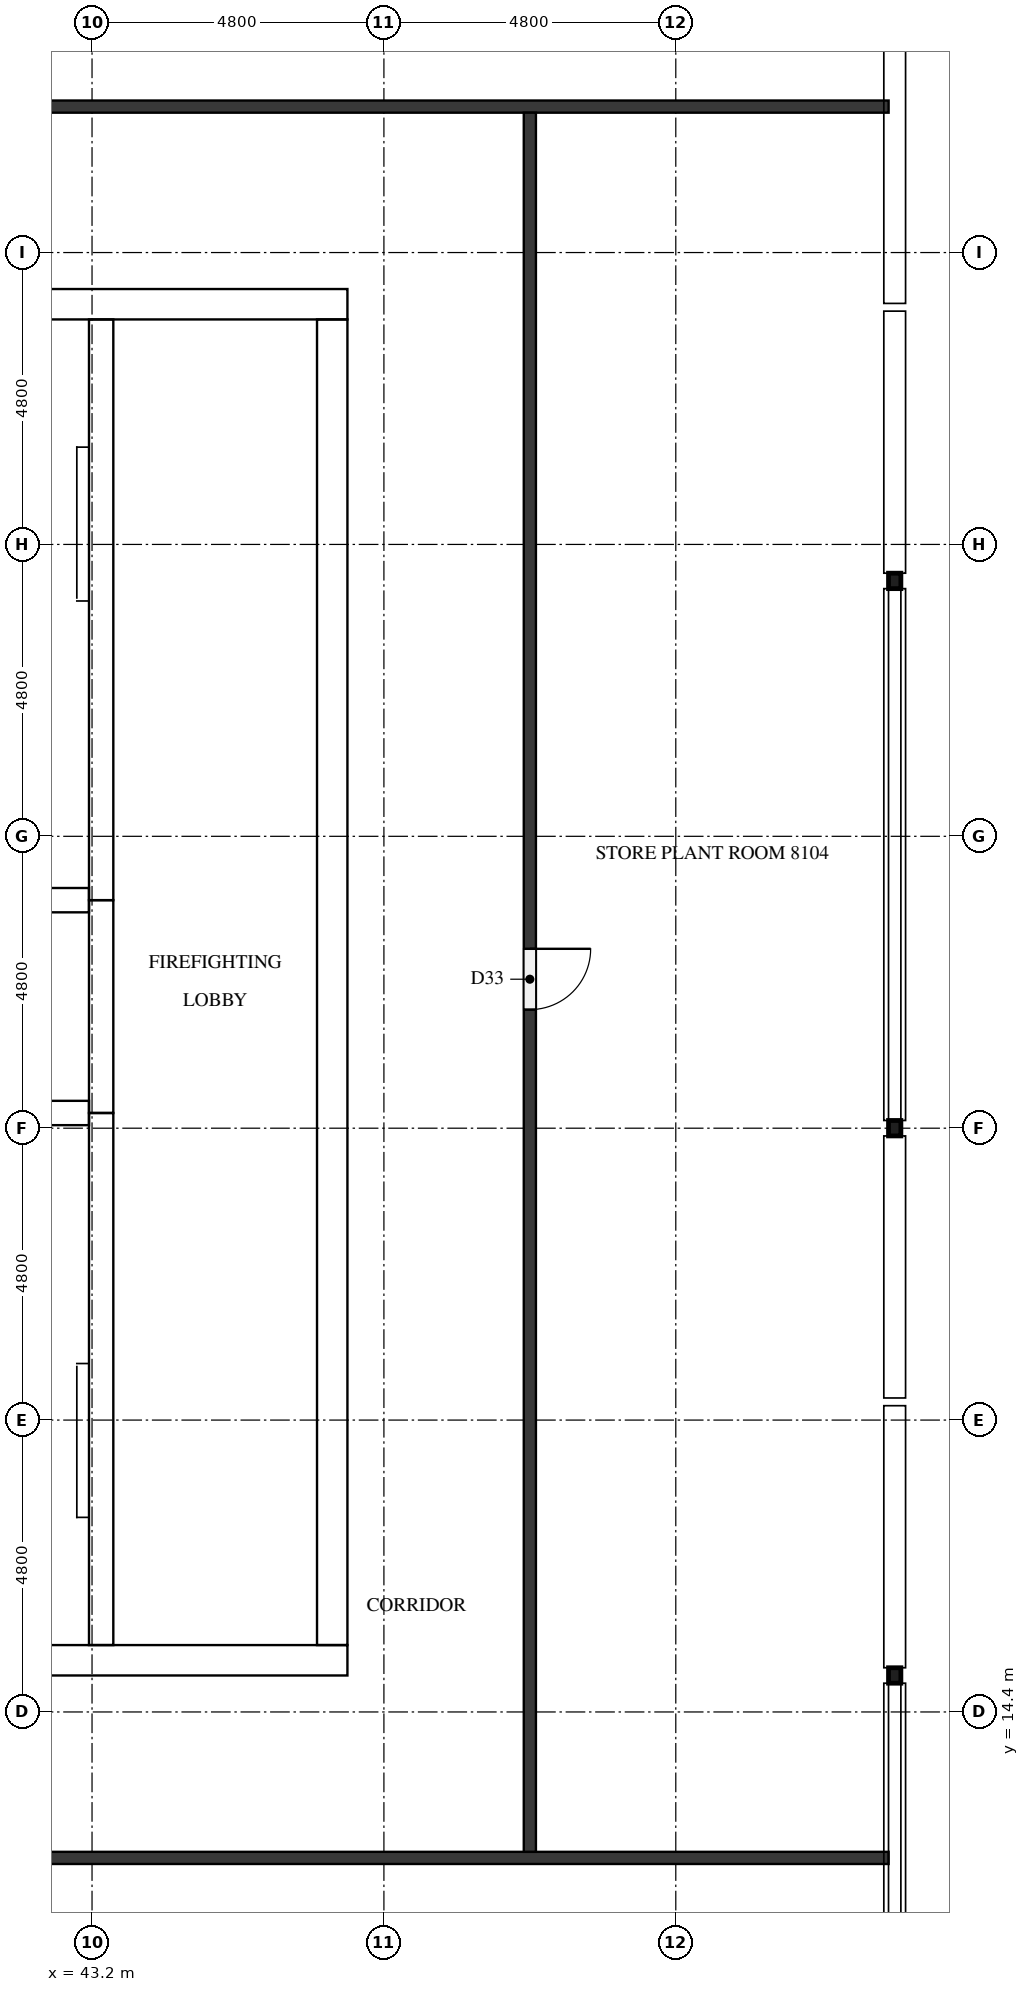
"""IFC4 building model, lengths in metres.
Left out: names, types, materials, properties, quantities, classifications, styles, units other than length and angle.
Written with IfcOpenShell. Run it as: python <this file> out.ifc"""

import sys

from ifc_helpers import new_model, si_unit, direction, frame, frame_2d, origin, origin_2d, place, context, subcontext, project, spatial, rectangle, hollow_rectangle, extrude, element, fill, save


model = new_model("IFC4")
c1 = context("Model", 3, precision=1e-05, world=origin(), true_north=direction((0.0, 1.0)))
c2 = subcontext(c1, "Body", "Model", "MODEL_VIEW")
j1 = project(units=[si_unit("LENGTHUNIT", "METRE"), si_unit("PLANEANGLEUNIT", "RADIAN")], contexts=[c1])
p1 = place(None, origin())
s1 = spatial("IfcSite", under=j1, at=p1, CompositionType="ELEMENT")
p2 = place(p1, origin())
s2 = spatial("IfcBuilding", under=s1, at=p2, CompositionType="ELEMENT")
p3 = place(p2, frame((0.0, 0.0, 314.3)))
s3 = spatial("IfcBuildingStorey", under=s2, at=p3, CompositionType="ELEMENT", Elevation=314.3)
p4 = place(p3, frame((15.0, 15.25, 0.0), z_axis=(0.0, 0.0, 1.0), x_axis=(1.0, 0.0, 0.0)))
e1 = element("IfcWall", 1, at=p4, inside=s3, PredefinedType="SHEAR", context=c2, shape_type="SweptSolid", body=[
    extrude(rectangle(XDim=32.4, YDim=0.5, at=frame_2d((16.2, 0.0))), origin(), (0.0, 0.0, 1.0), 2.6),
])
p5 = place(p4, frame((15.3, 0.0, 0.0)))
e2 = element("IfcOpeningElement", 2, at=p5, cuts=e1, PredefinedType="OPENING", context=c2, shape_type="SweptSolid", body=[
    extrude(rectangle(XDim=1.8, YDim=2.1, at=frame_2d((0.9, 1.05))), frame((0.0, 0.26, 0.0), z_axis=(0.0, -1.0, 0.0), x_axis=(1.0, 0.0, 0.0)), (0.0, 0.0, 1.0), 0.52),
])
p6 = place(p3, frame((15.0, 37.55, 0.0), z_axis=(0.0, 0.0, 1.0), x_axis=(1.0, 0.0, 0.0)))
e3 = element("IfcWall", 3, at=p6, inside=s3, PredefinedType="SHEAR", context=c2, shape_type="SweptSolid", body=[
    extrude(rectangle(XDim=32.4, YDim=0.5, at=frame_2d((16.2, 0.0))), origin(), (0.0, 0.0, 1.0), 2.6),
])
p7 = place(p6, frame((15.3, 0.0, 0.0)))
e4 = element("IfcOpeningElement", 4, at=p7, cuts=e3, PredefinedType="OPENING", context=c2, shape_type="SweptSolid", body=[
    extrude(rectangle(XDim=1.8, YDim=2.1, at=frame_2d((0.9, 1.05))), frame((0.0, 0.26, 0.0), z_axis=(0.0, -1.0, 0.0), x_axis=(1.0, 0.0, 0.0)), (0.0, 0.0, 1.0), 0.52),
])
p8 = place(p6, frame((1.282, 0.0, 0.0)))
e5 = element("IfcOpeningElement", 5, at=p8, cuts=e3, PredefinedType="OPENING", context=c2, shape_type="SweptSolid", body=[
    extrude(rectangle(XDim=1.0, YDim=2.1, at=frame_2d((0.5, 1.05))), frame((0.0, 0.26, 0.0), z_axis=(0.0, -1.0, 0.0), x_axis=(1.0, 0.0, 0.0)), (0.0, 0.0, 1.0), 0.52),
])
p9 = place(p6, frame((5.082, 0.0, 0.0)))
e6 = element("IfcOpeningElement", 6, at=p9, cuts=e3, PredefinedType="OPENING", context=c2, shape_type="SweptSolid", body=[
    extrude(rectangle(XDim=1.0, YDim=2.1, at=frame_2d((0.5, 1.05))), frame((0.0, 0.26, 0.0), z_axis=(0.0, -1.0, 0.0), x_axis=(1.0, 0.0, 0.0)), (0.0, 0.0, 1.0), 0.52),
])
p10 = place(p3, frame((47.15, 15.5, 0.0), z_axis=(0.0, 0.0, 1.0), x_axis=(0.0, 1.0, 0.0)))
e7 = element("IfcWall", 7, at=p10, inside=s3, PredefinedType="SHEAR", context=c2, shape_type="SweptSolid", body=[
    extrude(rectangle(XDim=21.8, YDim=0.5, at=frame_2d((10.9, 0.0))), origin(), (0.0, 0.0, 1.0), 2.6),
])
p11 = place(p10, frame((10.6, 0.0, 0.0)))
e8 = element("IfcOpeningElement", 8, at=p11, cuts=e7, PredefinedType="OPENING", context=c2, shape_type="SweptSolid", body=[
    extrude(rectangle(XDim=1.2, YDim=2.1, at=frame_2d((0.6, 1.05))), frame((0.0, 0.26, 0.0), z_axis=(0.0, -1.0, 0.0), x_axis=(1.0, 0.0, 0.0)), (0.0, 0.0, 1.0), 0.52),
])
p12 = place(p3, frame((43.35, 15.5, 0.0), z_axis=(0.0, 0.0, 1.0), x_axis=(0.0, 1.0, 0.0)))
e9 = element("IfcWall", 9, at=p12, inside=s3, PredefinedType="SHEAR", context=c2, shape_type="SweptSolid", body=[
    extrude(rectangle(XDim=8.75, YDim=0.4, at=frame_2d((4.375, 0.0))), origin(), (0.0, 0.0, 1.0), 2.6),
])
p13 = place(p12, frame((0.7, 0.0, 0.0)))
e10 = element("IfcOpeningElement", 10, at=p13, cuts=e9, PredefinedType="OPENING", context=c2, shape_type="SweptSolid", body=[
    extrude(rectangle(XDim=1.2, YDim=2.1, at=frame_2d((0.6, 1.05))), frame((0.0, 0.21, 0.0), z_axis=(0.0, -1.0, 0.0), x_axis=(1.0, 0.0, 0.0)), (0.0, 0.0, 1.0), 0.42),
])
p14 = place(p3, frame((43.35, 24.25, 0.0), z_axis=(0.0, 0.0, 1.0), x_axis=(0.0, 1.0, 0.0)))
e11 = element("IfcWall", 11, at=p14, inside=s3, PredefinedType="SHEAR", context=c2, shape_type="SweptSolid", body=[
    extrude(rectangle(XDim=3.5, YDim=0.4, at=frame_2d((1.75, 0.0))), origin(), (0.0, 0.0, 1.0), 2.6),
])
p15 = place(p14, frame((1.2, 0.0, 0.0)))
e12 = element("IfcOpeningElement", 12, at=p15, cuts=e11, PredefinedType="OPENING", context=c2, shape_type="SweptSolid", body=[
    extrude(rectangle(XDim=1.1, YDim=2.1, at=frame_2d((0.55, 1.05))), frame((0.0, 0.21, 0.0), z_axis=(0.0, -1.0, 0.0), x_axis=(1.0, 0.0, 0.0)), (0.0, 0.0, 1.0), 0.42),
])
p16 = place(p3, frame((43.35, 27.75, 0.0), z_axis=(0.0, 0.0, 1.0), x_axis=(0.0, 1.0, 0.0)))
e13 = element("IfcWall", 13, at=p16, inside=s3, PredefinedType="SHEAR", context=c2, shape_type="SweptSolid", body=[
    extrude(rectangle(XDim=9.55, YDim=0.4, at=frame_2d((4.775, 0.0))), origin(), (0.0, 0.0, 1.0), 2.6),
])
p17 = place(p16, frame((7.65, 0.0, 0.0)))
e14 = element("IfcOpeningElement", 14, at=p17, cuts=e13, PredefinedType="OPENING", context=c2, shape_type="SweptSolid", body=[
    extrude(rectangle(XDim=1.2, YDim=2.1, at=frame_2d((0.6, 1.05))), frame((0.0, 0.21, 0.0), z_axis=(0.0, -1.0, 0.0), x_axis=(1.0, 0.0, 0.0)), (0.0, 0.0, 1.0), 0.42),
])
for number, where, z_axis, x_axis in (
    (15, (39.5, 24.25, 0.0), (0.0, 0.0, 1.0), (1.0, 0.0, 0.0)),
    (16, (39.5, 27.75, 0.0), (0.0, 0.0, 1.0), (1.0, 0.0, 0.0)),
):
    element("IfcWall", number, at=place(p3, frame(where, z_axis=z_axis, x_axis=x_axis)), inside=s3, PredefinedType="SHEAR", context=c2, shape_type="SweptSolid", body=[
        extrude(rectangle(XDim=3.65, YDim=0.4, at=frame_2d((1.825, 0.0))), origin(), (0.0, 0.0, 1.0), 2.6),
    ])
for number, where, z_axis, x_axis in (
    (17, (56.4, 15.0, 0.0), (0.0, 0.0, 1.0), (1.0, 0.0, 0.0)),
    (18, (56.4, 24.0, 0.0), (0.0, 0.0, 1.0), (1.0, 0.0, 0.0)),
    (19, (56.4, 33.0, 0.0), (0.0, 0.0, 1.0), (1.0, 0.0, 0.0)),
):
    element("IfcColumn", number, at=place(p3, frame(where, z_axis=z_axis, x_axis=x_axis)), inside=s3, PredefinedType="COLUMN", context=c2, shape_type="SweptSolid", body=[
        extrude(hollow_rectangle(XDim=0.203, YDim=0.254, WallThickness=0.01, InnerFilletRadius=0.004, OuterFilletRadius=0.013, at=origin_2d()), origin(), (0.0, 0.0, 1.0), 2.6),
    ])
p18 = place(p3, frame((56.3, 12.0, 0.0), z_axis=(0.0, 0.0, 1.0), x_axis=(-1.0, 0.0, 0.0)))
e20 = element("IfcWall", 20, at=p18, inside=s3, PredefinedType="PARTITIONING", context=c2, shape_type="SweptSolid", body=[
    extrude(rectangle(XDim=55.0, YDim=0.2, at=frame_2d((27.5, 0.0))), origin(), (0.0, 0.0, 1.0), 2.6),
])
p19 = place(p18, frame((24.55, 0.0, 0.0)))
e21 = element("IfcOpeningElement", 21, at=p19, cuts=e20, PredefinedType="OPENING", context=c2, shape_type="SweptSolid", body=[
    extrude(rectangle(XDim=1.0, YDim=2.1, at=frame_2d((0.5, 1.05))), frame((0.0, 0.11, 0.0), z_axis=(0.0, -1.0, 0.0), x_axis=(1.0, 0.0, 0.0)), (0.0, 0.0, 1.0), 0.22),
])
p20 = place(p3, frame((1.3, 40.8, 0.0), z_axis=(0.0, 0.0, 1.0), x_axis=(1.0, 0.0, 0.0)))
e22 = element("IfcWall", 22, at=p20, inside=s3, PredefinedType="PARTITIONING", context=c2, shape_type="SweptSolid", body=[
    extrude(rectangle(XDim=55.0, YDim=0.2, at=frame_2d((27.5, 0.0))), origin(), (0.0, 0.0, 1.0), 2.6),
])
p21 = place(p20, frame((29.35, 0.0, 0.0)))
e23 = element("IfcOpeningElement", 23, at=p21, cuts=e22, PredefinedType="OPENING", context=c2, shape_type="SweptSolid", body=[
    extrude(rectangle(XDim=1.0, YDim=2.1, at=frame_2d((0.5, 1.05))), frame((0.0, 0.11, 0.0), z_axis=(0.0, -1.0, 0.0), x_axis=(1.0, 0.0, 0.0)), (0.0, 0.0, 1.0), 0.22),
])
p22 = place(p3, frame((50.4, 40.7, 0.0), z_axis=(0.0, 0.0, 1.0), x_axis=(0.0, -1.0, 0.0)))
e24 = element("IfcWall", 24, at=p22, inside=s3, PredefinedType="PARTITIONING", context=c2, shape_type="SweptSolid", body=[
    extrude(rectangle(XDim=28.6, YDim=0.2, at=frame_2d((14.3, 0.0))), origin(), (0.0, 0.0, 1.0), 2.6),
])
p23 = place(p22, frame((13.75, 0.0, 0.0)))
e25 = element("IfcOpeningElement", 25, at=p23, cuts=e24, PredefinedType="OPENING", context=c2, shape_type="SweptSolid", body=[
    extrude(rectangle(XDim=1.0, YDim=2.1, at=frame_2d((0.5, 1.05))), frame((0.0, 0.11, 0.0), z_axis=(0.0, -1.0, 0.0), x_axis=(1.0, 0.0, 0.0)), (0.0, 0.0, 1.0), 0.22),
])
p24 = place(p15, origin())
e26 = element("IfcDoor", 26, at=p24, inside=s3, OperationType="DOUBLE_DOOR_SLIDING", PredefinedType="DOOR", context=c2, shape_type="SweptSolid", body=[
    extrude(rectangle(XDim=1.1, YDim=2.1, at=frame_2d((0.55, 1.05))), frame((0.0, 0.025, 0.0), z_axis=(0.0, -1.0, 0.0), x_axis=(1.0, 0.0, 0.0)), (0.0, 0.0, 1.0), 0.05),
])
fill(e12, e26)
p25 = place(p13, origin())
e27 = element("IfcDoor", 27, at=p25, inside=s3, OperationType="SINGLE_SWING_RIGHT", PredefinedType="DOOR", context=c2, shape_type="SweptSolid", body=[
    extrude(rectangle(XDim=1.2, YDim=2.1, at=frame_2d((0.6, 1.05))), frame((0.0, 0.025, 0.0), z_axis=(0.0, -1.0, 0.0), x_axis=(1.0, 0.0, 0.0)), (0.0, 0.0, 1.0), 0.05),
])
fill(e10, e27)
p26 = place(p17, origin())
e28 = element("IfcDoor", 28, at=p26, inside=s3, OperationType="SINGLE_SWING_LEFT", PredefinedType="DOOR", context=c2, shape_type="SweptSolid", body=[
    extrude(rectangle(XDim=1.2, YDim=2.1, at=frame_2d((0.6, 1.05))), frame((0.0, 0.025, 0.0), z_axis=(0.0, -1.0, 0.0), x_axis=(1.0, 0.0, 0.0)), (0.0, 0.0, 1.0), 0.05),
])
fill(e14, e28)
p27 = place(p11, origin())
e29 = element("IfcDoor", 29, at=p27, inside=s3, OperationType="SINGLE_SWING_LEFT", PredefinedType="DOOR", context=c2, shape_type="SweptSolid", body=[
    extrude(rectangle(XDim=1.2, YDim=2.1, at=frame_2d((0.6, 1.05))), frame((0.0, 0.025, 0.0), z_axis=(0.0, -1.0, 0.0), x_axis=(1.0, 0.0, 0.0)), (0.0, 0.0, 1.0), 0.05),
])
fill(e8, e29)
p28 = place(p23, origin())
e30 = element("IfcDoor", 30, at=p28, inside=s3, OperationType="SINGLE_SWING_LEFT", PredefinedType="DOOR", context=c2, shape_type="SweptSolid", body=[
    extrude(rectangle(XDim=1.0, YDim=2.1, at=frame_2d((0.5, 1.05))), frame((0.0, 0.025, 0.0), z_axis=(0.0, -1.0, 0.0), x_axis=(1.0, 0.0, 0.0)), (0.0, 0.0, 1.0), 0.05),
])
fill(e25, e30)
save(model, sys.argv[1])
